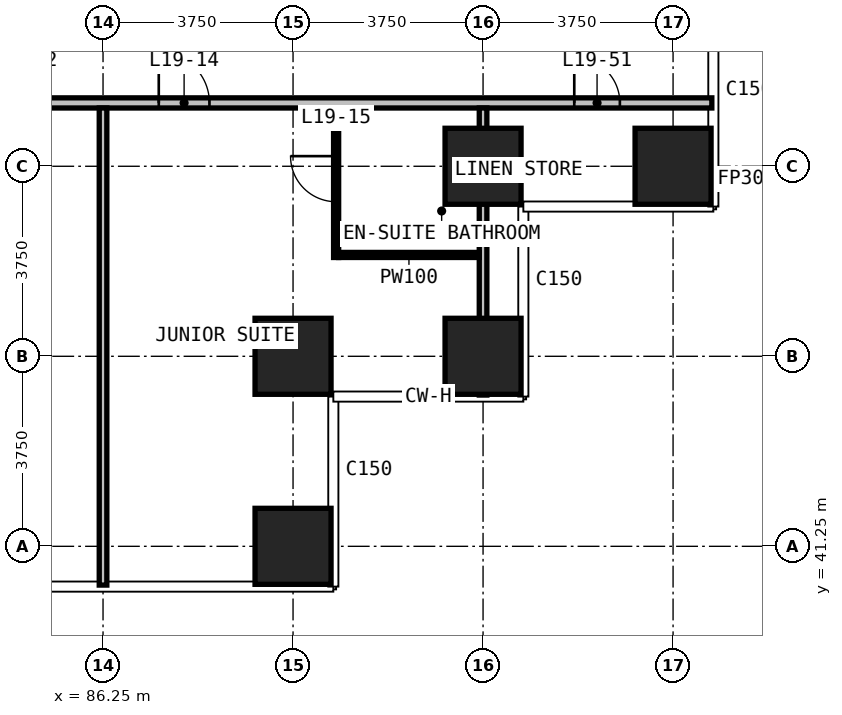
"""IFC4 building model, lengths in metres.
Left out: names, types, materials, properties, quantities, classifications, styles, units other than length and angle.
Written with IfcOpenShell. Run it as: python <this file> out.ifc"""

import sys

from ifc_helpers import new_model, si_unit, direction, frame, frame_2d, origin, origin_2d, place, context, subcontext, project, spatial, rectangle, extrude, element, fill, save


model = new_model("IFC4")
c1 = context("Model", 3, precision=1e-05, world=origin(), true_north=direction((0.0, 1.0)))
c2 = subcontext(c1, "Body", "Model", "MODEL_VIEW")
j1 = project(units=[si_unit("LENGTHUNIT", "METRE"), si_unit("PLANEANGLEUNIT", "RADIAN")], contexts=[c1])
p1 = place(None, origin())
s1 = spatial("IfcSite", under=j1, at=p1, CompositionType="ELEMENT")
p2 = place(p1, origin())
s2 = spatial("IfcBuilding", under=s1, at=p2, CompositionType="ELEMENT")
p3 = place(p2, frame((0.0, 0.0, 82.4)))
s3 = spatial("IfcBuildingStorey", under=s2, at=p3, CompositionType="ELEMENT", Elevation=82.4)
for number, where, z_axis, x_axis in (
    (1, (90.0, 41.25, 0.0), (0.0, 0.0, 1.0), (1.0, 0.0, 0.0)),
    (2, (90.0, 45.0, 0.0), (0.0, 0.0, 1.0), (1.0, 0.0, 0.0)),
    (3, (93.75, 45.0, 0.0), (0.0, 0.0, 1.0), (1.0, 0.0, 0.0)),
    (4, (93.75, 48.75, 0.0), (0.0, 0.0, 1.0), (1.0, 0.0, 0.0)),
    (5, (97.5, 48.75, 0.0), (0.0, 0.0, 1.0), (1.0, 0.0, 0.0)),
):
    element("IfcColumn", number, at=place(p3, frame(where, z_axis=z_axis, x_axis=x_axis)), inside=s3, PredefinedType="COLUMN", context=c2, shape_type="SweptSolid", body=[
        extrude(rectangle(XDim=1.5, YDim=1.5, at=origin_2d()), origin(), (0.0, 0.0, 1.0), 3.3),
    ])
p4 = place(p3, frame((51.735, 50.0, 0.0), z_axis=(0.0, 0.0, 1.0), x_axis=(1.0, 0.0, 0.0)))
e6 = element("IfcWall", 6, at=p4, inside=s3, PredefinedType="PARTITIONING", context=c2, shape_type="SweptSolid", body=[
    extrude(rectangle(XDim=46.53, YDim=0.2, at=frame_2d((23.265, 0.0))), origin(), (0.0, 0.0, 1.0), 3.0),
])
p5 = place(p4, frame((5.615, 0.0, 0.0)))
e7 = element("IfcOpeningElement", 7, at=p5, cuts=e6, PredefinedType="OPENING", context=c2, shape_type="SweptSolid", body=[
    extrude(rectangle(XDim=1.0, YDim=2.2, at=frame_2d((0.5, 1.1))), frame((0.0, 0.11, 0.0), z_axis=(0.0, -1.0, 0.0), x_axis=(1.0, 0.0, 0.0)), (0.0, 0.0, 1.0), 0.22),
])
p6 = place(p4, frame((17.415, 0.0, 0.0)))
e8 = element("IfcOpeningElement", 8, at=p6, cuts=e6, PredefinedType="OPENING", context=c2, shape_type="SweptSolid", body=[
    extrude(rectangle(XDim=1.0, YDim=2.2, at=frame_2d((0.5, 1.1))), frame((0.0, 0.11, 0.0), z_axis=(0.0, -1.0, 0.0), x_axis=(1.0, 0.0, 0.0)), (0.0, 0.0, 1.0), 0.22),
])
p7 = place(p4, frame((20.615, 0.0, 0.0)))
e9 = element("IfcOpeningElement", 9, at=p7, cuts=e6, PredefinedType="OPENING", context=c2, shape_type="SweptSolid", body=[
    extrude(rectangle(XDim=1.0, YDim=2.2, at=frame_2d((0.5, 1.1))), frame((0.0, 0.11, 0.0), z_axis=(0.0, -1.0, 0.0), x_axis=(1.0, 0.0, 0.0)), (0.0, 0.0, 1.0), 0.22),
])
p8 = place(p4, frame((32.415, 0.0, 0.0)))
e10 = element("IfcOpeningElement", 10, at=p8, cuts=e6, PredefinedType="OPENING", context=c2, shape_type="SweptSolid", body=[
    extrude(rectangle(XDim=1.0, YDim=2.2, at=frame_2d((0.5, 1.1))), frame((0.0, 0.11, 0.0), z_axis=(0.0, -1.0, 0.0), x_axis=(1.0, 0.0, 0.0)), (0.0, 0.0, 1.0), 0.22),
])
p9 = place(p4, frame((35.615, 0.0, 0.0)))
e11 = element("IfcOpeningElement", 11, at=p9, cuts=e6, PredefinedType="OPENING", context=c2, shape_type="SweptSolid", body=[
    extrude(rectangle(XDim=1.0, YDim=2.2, at=frame_2d((0.5, 1.1))), frame((0.0, 0.11, 0.0), z_axis=(0.0, -1.0, 0.0), x_axis=(1.0, 0.0, 0.0)), (0.0, 0.0, 1.0), 0.22),
])
p10 = place(p4, frame((1.8, 0.0, 0.0)))
e12 = element("IfcOpeningElement", 12, at=p10, cuts=e6, PredefinedType="OPENING", context=c2, shape_type="SweptSolid", body=[
    extrude(rectangle(XDim=0.9, YDim=2.2, at=frame_2d((0.45, 1.1))), frame((0.0, 0.11, 0.0), z_axis=(0.0, -1.0, 0.0), x_axis=(1.0, 0.0, 0.0)), (0.0, 0.0, 1.0), 0.22),
])
p11 = place(p4, frame((43.815, 0.0, 0.0)))
e13 = element("IfcOpeningElement", 13, at=p11, cuts=e6, PredefinedType="OPENING", context=c2, shape_type="SweptSolid", body=[
    extrude(rectangle(XDim=0.9, YDim=2.2, at=frame_2d((0.45, 1.1))), frame((0.0, 0.11, 0.0), z_axis=(0.0, -1.0, 0.0), x_axis=(1.0, 0.0, 0.0)), (0.0, 0.0, 1.0), 0.22),
])
p12 = place(p3, frame((86.25, 40.485, 0.0), z_axis=(0.0, 0.0, 1.0), x_axis=(0.0, 1.0, 0.0)))
e14 = element("IfcWall", 14, at=p12, inside=s3, PredefinedType="PARTITIONING", context=c2, shape_type="SweptSolid", body=[
    extrude(rectangle(XDim=9.415, YDim=0.15, at=frame_2d((4.708, 0.0))), origin(), (0.0, 0.0, 1.0), 3.0),
])
p13 = place(p3, frame((93.75, 44.235, 0.0), z_axis=(0.0, 0.0, 1.0), x_axis=(0.0, 1.0, 0.0)))
e15 = element("IfcWall", 15, at=p13, inside=s3, PredefinedType="PARTITIONING", context=c2, shape_type="SweptSolid", body=[
    extrude(rectangle(XDim=5.665, YDim=0.15, at=frame_2d((2.833, 0.0))), origin(), (0.0, 0.0, 1.0), 3.0),
])
p14 = place(p3, frame((90.9, 47.0, 0.0), z_axis=(0.0, 0.0, 1.0), x_axis=(1.0, 0.0, 0.0)))
e16 = element("IfcWall", 16, at=p14, inside=s3, PredefinedType="PARTITIONING", context=c2, shape_type="SweptSolid", body=[
    extrude(rectangle(XDim=2.775, YDim=0.1, at=frame_2d((1.388, 0.0))), origin(), (0.0, 0.0, 1.0), 3.0),
])
p15 = place(p3, frame((90.85, 46.95, 0.0), z_axis=(0.0, 0.0, 1.0), x_axis=(0.0, 1.0, 0.0)))
e17 = element("IfcWall", 17, at=p15, inside=s3, PredefinedType="PARTITIONING", context=c2, shape_type="SweptSolid", body=[
    extrude(rectangle(XDim=2.95, YDim=0.1, at=frame_2d((1.475, 0.0))), origin(), (0.0, 0.0, 1.0), 3.0),
])
p16 = place(p15, frame((1.1, 0.0, 0.0)))
e18 = element("IfcOpeningElement", 18, at=p16, cuts=e17, PredefinedType="OPENING", context=c2, shape_type="SweptSolid", body=[
    extrude(rectangle(XDim=0.9, YDim=2.2, at=frame_2d((0.45, 1.1))), frame((0.0, 0.06, 0.0), z_axis=(0.0, -1.0, 0.0), x_axis=(1.0, 0.0, 0.0)), (0.0, 0.0, 1.0), 0.12),
])
p17 = place(p9, origin())
e19 = element("IfcDoor", 19, at=p17, inside=s3, OperationType="SINGLE_SWING_LEFT", PredefinedType="DOOR", context=c2, shape_type="SweptSolid", body=[
    extrude(rectangle(XDim=1.0, YDim=2.2, at=frame_2d((0.5, 1.1))), frame((0.0, 0.025, 0.0), z_axis=(0.0, -1.0, 0.0), x_axis=(1.0, 0.0, 0.0)), (0.0, 0.0, 1.0), 0.05),
])
fill(e11, e19)
p18 = place(p16, origin())
e20 = element("IfcDoor", 20, at=p18, inside=s3, OperationType="SINGLE_SWING_RIGHT", PredefinedType="DOOR", context=c2, shape_type="SweptSolid", body=[
    extrude(rectangle(XDim=0.9, YDim=2.2, at=frame_2d((0.45, 1.1))), frame((0.0, 0.025, 0.0), z_axis=(0.0, -1.0, 0.0), x_axis=(1.0, 0.0, 0.0)), (0.0, 0.0, 1.0), 0.05),
])
fill(e18, e20)
p19 = place(p11, origin())
e21 = element("IfcDoor", 21, at=p19, inside=s3, OperationType="SINGLE_SWING_RIGHT", PredefinedType="DOOR", context=c2, shape_type="SweptSolid", body=[
    extrude(rectangle(XDim=0.9, YDim=2.2, at=frame_2d((0.45, 1.1))), frame((0.0, 0.025, 0.0), z_axis=(0.0, -1.0, 0.0), x_axis=(1.0, 0.0, 0.0)), (0.0, 0.0, 1.0), 0.05),
])
fill(e13, e21)
save(model, sys.argv[1])
